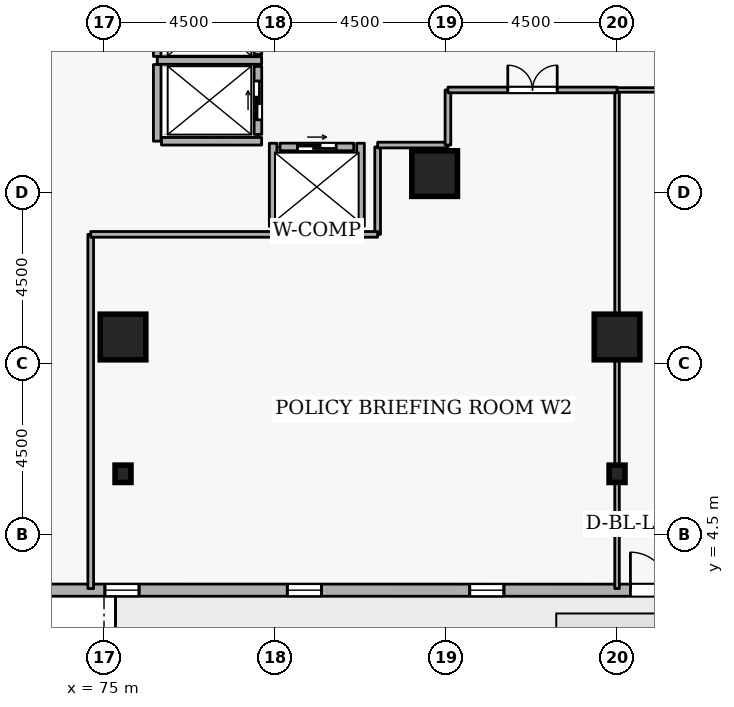
"""IFC4 building model, lengths in metres.
Left out: names, types, materials, properties, quantities, classifications, styles, units other than length and angle.
Written with IfcOpenShell. Run it as: python <this file> out.ifc"""

import sys

from ifc_helpers import new_model, si_unit, direction, frame, frame_2d, origin, origin_2d, place, context, subcontext, project, spatial, rectangle, i_section, extrude, element, fill, save


model = new_model("IFC4")
c1 = context("Model", 3, precision=1e-05, world=origin(), true_north=direction((0.0, 1.0)))
c2 = subcontext(c1, "Body", "Model", "MODEL_VIEW")
j1 = project(units=[si_unit("LENGTHUNIT", "METRE"), si_unit("PLANEANGLEUNIT", "RADIAN")], contexts=[c1])
p1 = place(None, origin())
s1 = spatial("IfcSite", under=j1, at=p1, CompositionType="ELEMENT")
p2 = place(p1, origin())
s2 = spatial("IfcBuilding", under=s1, at=p2, CompositionType="ELEMENT")
p3 = place(p2, frame((0.0, 0.0, 101.7)))
s3 = spatial("IfcBuildingStorey", under=s2, at=p3, CompositionType="ELEMENT", Elevation=101.7)
for number, where, z_axis, x_axis in (
    (1, (88.5, 9.7, 0.0), (0.0, 0.0, 1.0), (1.0, 0.0, 0.0)),
    (2, (75.5, 9.7, 0.0), (0.0, 0.0, 1.0), (1.0, 0.0, 0.0)),
    (3, (83.7, 14.0, 0.0), (0.0, 0.0, 1.0), (1.0, 0.0, 0.0)),
):
    element("IfcColumn", number, at=place(p3, frame(where, z_axis=z_axis, x_axis=x_axis)), inside=s3, PredefinedType="COLUMN", context=c2, shape_type="SweptSolid", body=[
        extrude(rectangle(XDim=1.2, YDim=1.2, at=origin_2d()), origin(), (0.0, 0.0, 1.0), 3.6),
    ])
for number, where, z_axis, x_axis in (
    (4, (88.5, 6.1, 0.0), (0.0, 0.0, 1.0), (1.0, 0.0, 0.0)),
    (5, (75.5, 6.1, 0.0), (0.0, 0.0, 1.0), (1.0, 0.0, 0.0)),
):
    element("IfcColumn", number, at=place(p3, frame(where, z_axis=z_axis, x_axis=x_axis)), inside=s3, PredefinedType="COLUMN", context=c2, shape_type="SweptSolid", body=[
        extrude(i_section(OverallWidth=0.418, OverallDepth=0.456, WebThickness=0.042, FlangeThickness=0.067, FilletRadius=0.015, at=origin_2d()), origin(), (0.0, 0.0, 1.0), 3.6),
    ])
p4 = place(p3, frame((68.423, 3.04, 0.0), z_axis=(0.0, 0.0, 1.0), x_axis=(0.99999999315, -0.00011704845, 0.0)))
e6 = element("IfcWall", 6, at=p4, inside=s3, PredefinedType="STANDARD", context=c2, shape_type="SweptSolid", body=[
    extrude(rectangle(XDim=35.459, YDim=0.32, at=frame_2d((17.729, 0.0))), origin(), (0.0, 0.0, 1.0), 2.7),
])
p5 = place(p4, frame((20.429, 0.0, 0.0)))
e7 = element("IfcOpeningElement", 7, at=p5, cuts=e6, PredefinedType="OPENING", context=c2, shape_type="SweptSolid", body=[
    extrude(rectangle(XDim=1.0, YDim=2.08, at=frame_2d((0.5, 1.04))), frame((0.0, 0.17, 0.0), z_axis=(0.0, -1.0, 0.0), x_axis=(1.0, 0.0, 0.0)), (0.0, 0.0, 1.0), 0.34),
])
p6 = place(p4, frame((1.8, 0.0, 0.72)))
e8 = element("IfcOpeningElement", 8, at=p6, cuts=e6, PredefinedType="OPENING", context=c2, shape_type="SweptSolid", body=[
    extrude(rectangle(XDim=0.9, YDim=1.75, at=frame_2d((0.45, 0.875))), frame((0.0, 0.17, 0.0), z_axis=(0.0, -1.0, 0.0), x_axis=(1.0, 0.0, 0.0)), (0.0, 0.0, 1.0), 0.34),
])
p7 = place(p4, frame((6.6, 0.0, 0.72)))
e9 = element("IfcOpeningElement", 9, at=p7, cuts=e6, PredefinedType="OPENING", context=c2, shape_type="SweptSolid", body=[
    extrude(rectangle(XDim=0.9, YDim=1.75, at=frame_2d((0.45, 0.875))), frame((0.0, 0.17, 0.0), z_axis=(0.0, -1.0, 0.0), x_axis=(1.0, 0.0, 0.0)), (0.0, 0.0, 1.0), 0.34),
])
p8 = place(p4, frame((11.4, 0.0, 0.72)))
e10 = element("IfcOpeningElement", 10, at=p8, cuts=e6, PredefinedType="OPENING", context=c2, shape_type="SweptSolid", body=[
    extrude(rectangle(XDim=0.9, YDim=1.75, at=frame_2d((0.45, 0.875))), frame((0.0, 0.17, 0.0), z_axis=(0.0, -1.0, 0.0), x_axis=(1.0, 0.0, 0.0)), (0.0, 0.0, 1.0), 0.34),
])
p9 = place(p4, frame((16.2, 0.0, 0.72)))
e11 = element("IfcOpeningElement", 11, at=p9, cuts=e6, PredefinedType="OPENING", context=c2, shape_type="SweptSolid", body=[
    extrude(rectangle(XDim=0.9, YDim=1.75, at=frame_2d((0.45, 0.875))), frame((0.0, 0.17, 0.0), z_axis=(0.0, -1.0, 0.0), x_axis=(1.0, 0.0, 0.0)), (0.0, 0.0, 1.0), 0.34),
])
p10 = place(p4, frame((25.8, 0.0, 0.72)))
e12 = element("IfcOpeningElement", 12, at=p10, cuts=e6, PredefinedType="OPENING", context=c2, shape_type="SweptSolid", body=[
    extrude(rectangle(XDim=0.9, YDim=1.75, at=frame_2d((0.45, 0.875))), frame((0.0, 0.17, 0.0), z_axis=(0.0, -1.0, 0.0), x_axis=(1.0, 0.0, 0.0)), (0.0, 0.0, 1.0), 0.34),
])
p11 = place(p4, frame((30.6, 0.0, 0.72)))
e13 = element("IfcOpeningElement", 13, at=p11, cuts=e6, PredefinedType="OPENING", context=c2, shape_type="SweptSolid", body=[
    extrude(rectangle(XDim=0.9, YDim=1.75, at=frame_2d((0.45, 0.875))), frame((0.0, 0.17, 0.0), z_axis=(0.0, -1.0, 0.0), x_axis=(1.0, 0.0, 0.0)), (0.0, 0.0, 1.0), 0.34),
])
p12 = place(p3, frame((79.05, 17.13, 0.0), z_axis=(0.0, 0.0, 1.0), x_axis=(0.0, 1.0, 0.0)))
e14 = element("IfcWall", 14, at=p12, inside=s3, PredefinedType="STANDARD", context=c2, shape_type="SweptSolid", body=[
    extrude(rectangle(XDim=1.74, YDim=0.2, at=frame_2d((0.87, 0.0))), origin(), (0.0, 0.0, 1.0), 3.34),
])
p13 = place(p12, frame((0.36, 0.0, 0.0)))
e15 = element("IfcOpeningElement", 15, at=p13, cuts=e14, PredefinedType="OPENING", context=c2, shape_type="SweptSolid", body=[
    extrude(rectangle(XDim=1.02, YDim=2.06, at=frame_2d((0.51, 1.03))), frame((0.0, 0.11, 0.0), z_axis=(0.0, -1.0, 0.0), x_axis=(1.0, 0.0, 0.0)), (0.0, 0.0, 1.0), 0.22),
])
p14 = place(p3, frame((79.05, 15.03, 0.0), z_axis=(0.0, 0.0, 1.0), x_axis=(0.0, 1.0, 0.0)))
e16 = element("IfcWall", 16, at=p14, inside=s3, PredefinedType="STANDARD", context=c2, shape_type="SweptSolid", body=[
    extrude(rectangle(XDim=1.79, YDim=0.2, at=frame_2d((0.895, 0.0))), origin(), (0.0, 0.0, 1.0), 3.34),
])
p15 = place(p14, frame((0.385, 0.0, 0.0)))
e17 = element("IfcOpeningElement", 17, at=p15, cuts=e16, PredefinedType="OPENING", context=c2, shape_type="SweptSolid", body=[
    extrude(rectangle(XDim=1.02, YDim=2.06, at=frame_2d((0.51, 1.03))), frame((0.0, 0.11, 0.0), z_axis=(0.0, -1.0, 0.0), x_axis=(1.0, 0.0, 0.0)), (0.0, 0.0, 1.0), 0.22),
])
p16 = place(p3, frame((79.63, 14.7, 0.0), z_axis=(0.0, 0.0, 1.0), x_axis=(1.0, 0.0, 0.0)))
e18 = element("IfcWall", 18, at=p16, inside=s3, PredefinedType="STANDARD", context=c2, shape_type="SweptSolid", body=[
    extrude(rectangle(XDim=1.94, YDim=0.2, at=frame_2d((0.97, 0.0))), origin(), (0.0, 0.0, 1.0), 3.34),
])
p17 = place(p16, frame((0.46, 0.0, 0.0)))
e19 = element("IfcOpeningElement", 19, at=p17, cuts=e18, PredefinedType="OPENING", context=c2, shape_type="SweptSolid", body=[
    extrude(rectangle(XDim=1.02, YDim=2.06, at=frame_2d((0.51, 1.03))), frame((0.0, 0.11, 0.0), z_axis=(0.0, -1.0, 0.0), x_axis=(1.0, 0.0, 0.0)), (0.0, 0.0, 1.0), 0.22),
])
p18 = place(p3, frame((76.402, 16.975, 0.0), z_axis=(0.0, 0.0, 1.0), x_axis=(1.0, 0.0, 0.0)))
e20 = element("IfcWall", 20, at=p18, inside=s3, PredefinedType="STANDARD", context=c2, shape_type="SweptSolid", body=[
    extrude(rectangle(XDim=2.746, YDim=0.2, at=frame_2d((1.373, 0.0))), origin(), (0.0, 0.0, 1.0), 3.34),
])
p19 = place(p3, frame((76.4, 14.852, 0.0), z_axis=(0.0, 0.0, 1.0), x_axis=(0.0, 1.0, 0.0)))
e21 = element("IfcWall", 21, at=p19, inside=s3, PredefinedType="STANDARD", context=c2, shape_type="SweptSolid", body=[
    extrude(rectangle(XDim=2.016, YDim=0.2, at=frame_2d((1.008, 0.0))), origin(), (0.0, 0.0, 1.0), 3.34),
])
p20 = place(p3, frame((76.4, 17.082, 0.0), z_axis=(0.0, 0.0, 1.0), x_axis=(0.0, 1.0, 0.0)))
e22 = element("IfcWall", 22, at=p20, inside=s3, PredefinedType="STANDARD", context=c2, shape_type="SweptSolid", body=[
    extrude(rectangle(XDim=1.856, YDim=0.2, at=frame_2d((0.928, 0.0))), origin(), (0.0, 0.0, 1.0), 3.34),
])
p21 = place(p3, frame((76.512, 14.85, 0.0), z_axis=(0.0, 0.0, 1.0), x_axis=(1.0, 0.0, 0.0)))
e23 = element("IfcWall", 23, at=p21, inside=s3, PredefinedType="STANDARD", context=c2, shape_type="SweptSolid", body=[
    extrude(rectangle(XDim=2.636, YDim=0.2, at=frame_2d((1.318, 0.0))), origin(), (0.0, 0.0, 1.0), 3.34),
])
p22 = place(p3, frame((79.452, 12.5, 0.0), z_axis=(0.0, 0.0, 1.0), x_axis=(1.0, 0.0, 0.0)))
e24 = element("IfcWall", 24, at=p22, inside=s3, PredefinedType="STANDARD", context=c2, shape_type="SweptSolid", body=[
    extrude(rectangle(XDim=2.296, YDim=0.2, at=frame_2d((1.148, 0.0))), origin(), (0.0, 0.0, 1.0), 3.34),
])
for number, where, z_axis, x_axis in (
    (25, (81.75, 12.612, 0.0), (0.0, 0.0, 1.0), (0.0, 1.0, 0.0)),
    (26, (79.45, 12.612, 0.0), (0.0, 0.0, 1.0), (0.0, 1.0, 0.0)),
):
    element("IfcWall", number, at=place(p3, frame(where, z_axis=z_axis, x_axis=x_axis)), inside=s3, PredefinedType="STANDARD", context=c2, shape_type="SweptSolid", body=[
        extrude(rectangle(XDim=2.186, YDim=0.2, at=frame_2d((1.093, 0.0))), origin(), (0.0, 0.0, 1.0), 3.34),
    ])
p23 = place(p3, frame((88.5, 3.08, 0.0), z_axis=(0.0, 0.0, 1.0), x_axis=(0.0, 1.0, 0.0)))
e27 = element("IfcWall", 27, at=p23, inside=s3, PredefinedType="PARTITIONING", context=c2, shape_type="SweptSolid", body=[
    extrude(rectangle(XDim=13.12, YDim=0.12, at=frame_2d((6.56, 0.0))), origin(), (0.0, 0.0, 1.0), 2.878),
])
p24 = place(p3, frame((88.5, 16.2, 0.0), z_axis=(0.0, 0.0, 1.0), x_axis=(1.0, 0.0, 0.0)))
e28 = element("IfcWall", 28, at=p24, inside=s3, PredefinedType="PARTITIONING", context=c2, shape_type="SweptSolid", body=[
    extrude(rectangle(XDim=4.45, YDim=0.12, at=frame_2d((2.225, 0.0))), origin(), (0.0, 0.0, 1.0), 3.34),
])
p25 = place(p24, frame((1.7, 0.0, 0.0)))
e29 = element("IfcOpeningElement", 29, at=p25, cuts=e28, PredefinedType="OPENING", context=c2, shape_type="SweptSolid", body=[
    extrude(rectangle(XDim=1.05, YDim=2.1, at=frame_2d((0.525, 1.05))), frame((0.0, 0.07, 0.0), z_axis=(0.0, -1.0, 0.0), x_axis=(1.0, 0.0, 0.0)), (0.0, 0.0, 1.0), 0.14),
])
p26 = place(p3, frame((82.2, 12.4, 0.0), z_axis=(0.0, 0.0, 1.0), x_axis=(0.0, 1.0, 0.0)))
e30 = element("IfcWall", 30, at=p26, inside=s3, PredefinedType="PARTITIONING", context=c2, shape_type="SweptSolid", body=[
    extrude(rectangle(XDim=2.3, YDim=0.15, at=frame_2d((1.15, 0.0))), origin(), (0.0, 0.0, 1.0), 3.34),
])
p27 = place(p3, frame((82.2, 14.75, 0.0), z_axis=(0.0, 0.0, 1.0), x_axis=(1.0, 0.0, 0.0)))
e31 = element("IfcWall", 31, at=p27, inside=s3, PredefinedType="PARTITIONING", context=c2, shape_type="SweptSolid", body=[
    extrude(rectangle(XDim=1.85, YDim=0.15, at=frame_2d((0.925, 0.0))), origin(), (0.0, 0.0, 1.0), 3.34),
])
p28 = place(p3, frame((84.05, 14.75, 0.0), z_axis=(0.0, 0.0, 1.0), x_axis=(0.0, 1.0, 0.0)))
e32 = element("IfcWall", 32, at=p28, inside=s3, PredefinedType="PARTITIONING", context=c2, shape_type="SweptSolid", body=[
    extrude(rectangle(XDim=1.45, YDim=0.15, at=frame_2d((0.725, 0.0))), origin(), (0.0, 0.0, 1.0), 3.34),
])
p29 = place(p3, frame((84.05, 16.2, 0.0), z_axis=(0.0, 0.0, 1.0), x_axis=(1.0, 0.0, 0.0)))
e33 = element("IfcWall", 33, at=p29, inside=s3, PredefinedType="PARTITIONING", context=c2, shape_type="SweptSolid", body=[
    extrude(rectangle(XDim=4.45, YDim=0.15, at=frame_2d((2.225, 0.0))), origin(), (0.0, 0.0, 1.0), 3.34),
])
p30 = place(p29, frame((1.575, 0.0, 0.0)))
e34 = element("IfcOpeningElement", 34, at=p30, cuts=e33, PredefinedType="OPENING", context=c2, shape_type="SweptSolid", body=[
    extrude(rectangle(XDim=1.3, YDim=2.12, at=frame_2d((0.65, 1.06))), frame((0.0, 0.085, 0.0), z_axis=(0.0, -1.0, 0.0), x_axis=(1.0, 0.0, 0.0)), (0.0, 0.0, 1.0), 0.17),
])
p31 = place(p3, frame((74.65, 3.08, 0.0), z_axis=(0.0, 0.0, 1.0), x_axis=(0.0, 1.0, 0.0)))
e35 = element("IfcWall", 35, at=p31, inside=s3, PredefinedType="PARTITIONING", context=c2, shape_type="SweptSolid", body=[
    extrude(rectangle(XDim=9.32, YDim=0.15, at=frame_2d((4.66, 0.0))), origin(), (0.0, 0.0, 1.0), 3.34),
])
p32 = place(p3, frame((74.65, 12.4, 0.0), z_axis=(0.0, 0.0, 1.0), x_axis=(1.0, 0.0, 0.0)))
e36 = element("IfcWall", 36, at=p32, inside=s3, PredefinedType="PARTITIONING", context=c2, shape_type="SweptSolid", body=[
    extrude(rectangle(XDim=4.802, YDim=0.15, at=frame_2d((2.401, 0.0))), origin(), (0.0, 0.0, 1.0), 3.34),
])
p33 = place(p3, frame((81.748, 12.4, 0.0), z_axis=(0.0, 0.0, 1.0), x_axis=(1.0, 0.0, 0.0)))
e37 = element("IfcWall", 37, at=p33, inside=s3, PredefinedType="PARTITIONING", context=c2, shape_type="SweptSolid", body=[
    extrude(rectangle(XDim=0.452, YDim=0.15, at=frame_2d((0.226, 0.0))), origin(), (0.0, 0.0, 1.0), 3.34),
])
p34 = place(p5, origin())
e38 = element("IfcDoor", 38, at=p34, inside=s3, OperationType="SINGLE_SWING_LEFT", PredefinedType="DOOR", context=c2, shape_type="SweptSolid", body=[
    extrude(rectangle(XDim=1.0, YDim=2.08, at=frame_2d((0.5, 1.04))), frame((0.0, 0.025, 0.0), z_axis=(0.0, -1.0, 0.0), x_axis=(1.0, 0.0, 0.0)), (0.0, 0.0, 1.0), 0.05),
])
fill(e7, e38)
p35 = place(p7, origin())
e39 = element("IfcWindow", 39, at=p35, inside=s3, PartitioningType="SINGLE_PANEL", PredefinedType="WINDOW", context=c2, shape_type="SweptSolid", body=[
    extrude(rectangle(XDim=0.9, YDim=1.75, at=frame_2d((0.45, 0.875))), frame((0.0, 0.03, 0.0), z_axis=(0.0, -1.0, 0.0), x_axis=(1.0, 0.0, 0.0)), (0.0, 0.0, 1.0), 0.06),
])
fill(e9, e39)
p36 = place(p8, origin())
e40 = element("IfcWindow", 40, at=p36, inside=s3, PartitioningType="SINGLE_PANEL", PredefinedType="WINDOW", context=c2, shape_type="SweptSolid", body=[
    extrude(rectangle(XDim=0.9, YDim=1.75, at=frame_2d((0.45, 0.875))), frame((0.0, 0.03, 0.0), z_axis=(0.0, -1.0, 0.0), x_axis=(1.0, 0.0, 0.0)), (0.0, 0.0, 1.0), 0.06),
])
fill(e10, e40)
p37 = place(p9, origin())
e41 = element("IfcWindow", 41, at=p37, inside=s3, PartitioningType="SINGLE_PANEL", PredefinedType="WINDOW", context=c2, shape_type="SweptSolid", body=[
    extrude(rectangle(XDim=0.9, YDim=1.75, at=frame_2d((0.45, 0.875))), frame((0.0, 0.03, 0.0), z_axis=(0.0, -1.0, 0.0), x_axis=(1.0, 0.0, 0.0)), (0.0, 0.0, 1.0), 0.06),
])
fill(e11, e41)
p38 = place(p15, origin())
e42 = element("IfcDoor", 42, at=p38, inside=s3, OperationType="SLIDING_TO_LEFT", PredefinedType="DOOR", context=c2, shape_type="SweptSolid", body=[
    extrude(rectangle(XDim=1.02, YDim=2.06, at=frame_2d((0.51, 1.03))), frame((0.0, 0.025, 0.0), z_axis=(0.0, -1.0, 0.0), x_axis=(1.0, 0.0, 0.0)), (0.0, 0.0, 1.0), 0.05),
])
fill(e17, e42)
p39 = place(p17, origin())
e43 = element("IfcDoor", 43, at=p39, inside=s3, OperationType="SLIDING_TO_LEFT", PredefinedType="DOOR", context=c2, shape_type="SweptSolid", body=[
    extrude(rectangle(XDim=1.02, YDim=2.06, at=frame_2d((0.51, 1.03))), frame((0.0, 0.025, 0.0), z_axis=(0.0, -1.0, 0.0), x_axis=(1.0, 0.0, 0.0)), (0.0, 0.0, 1.0), 0.05),
])
fill(e19, e43)
p40 = place(p30, origin())
e44 = element("IfcDoor", 44, at=p40, inside=s3, OperationType="DOUBLE_DOOR_SINGLE_SWING", PredefinedType="DOOR", context=c2, shape_type="SweptSolid", body=[
    extrude(rectangle(XDim=1.3, YDim=2.12, at=frame_2d((0.65, 1.06))), frame((0.0, 0.025, 0.0), z_axis=(0.0, -1.0, 0.0), x_axis=(1.0, 0.0, 0.0)), (0.0, 0.0, 1.0), 0.05),
])
fill(e34, e44)
save(model, sys.argv[1])
